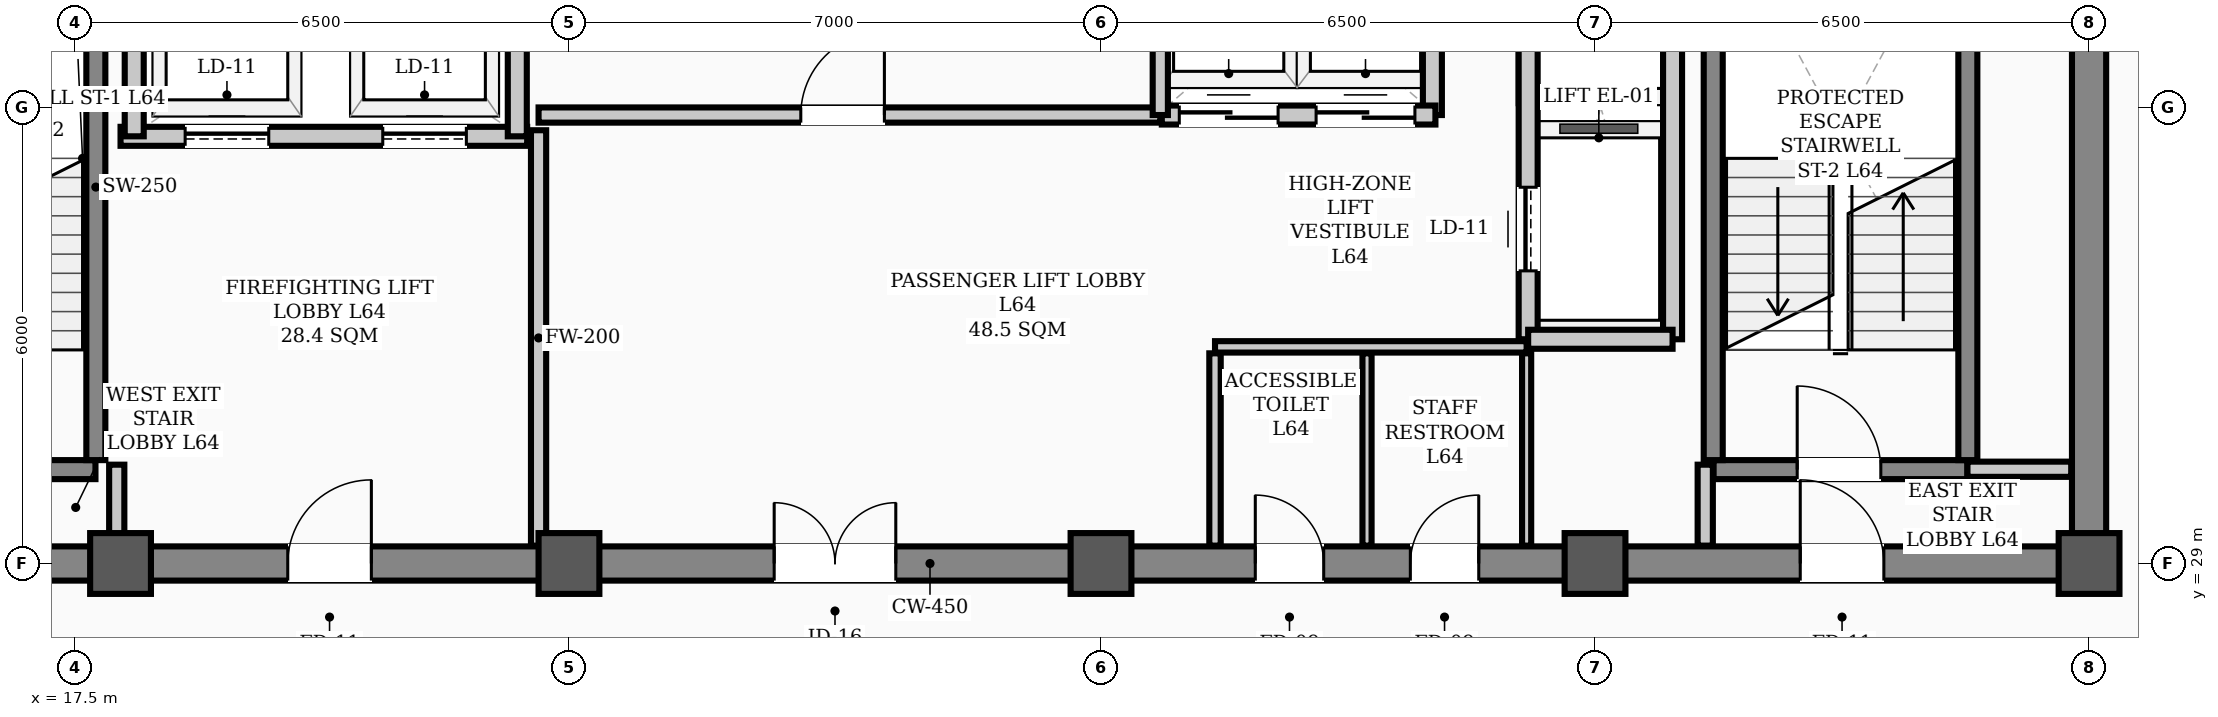
"""IFC4 building model, lengths in metres.
Left out: names, types, materials, properties, quantities, classifications, styles, units other than length and angle.
Written with IfcOpenShell. Run it as: python <this file> out.ifc"""

import sys

from ifc_helpers import new_model, si_unit, direction, frame, frame_2d, origin, origin_2d, place, context, subcontext, project, spatial, rectangle, hollow_rectangle, extrude, element, fill, save


model = new_model("IFC4")
c1 = context("Model", 3, precision=1e-05, world=origin(), true_north=direction((0.0, 1.0)))
c2 = subcontext(c1, "Body", "Model", "MODEL_VIEW")
j1 = project(units=[si_unit("LENGTHUNIT", "METRE"), si_unit("PLANEANGLEUNIT", "RADIAN")], contexts=[c1])
p1 = place(None, origin())
s1 = spatial("IfcSite", under=j1, at=p1, CompositionType="ELEMENT")
p2 = place(p1, origin())
s2 = spatial("IfcBuilding", under=s1, at=p2, CompositionType="ELEMENT")
p3 = place(p2, frame((0.0, 0.0, 257.9)))
s3 = spatial("IfcBuildingStorey", under=s2, at=p3, CompositionType="ELEMENT", Elevation=257.9)
for number, where, z_axis, x_axis in (
    (1, (18.1, 29.0, 0.0), (0.0, 0.0, 1.0), (1.0, 0.0, 0.0)),
    (2, (24.0, 29.0, 0.0), (0.0, 0.0, 1.0), (1.0, 0.0, 0.0)),
    (3, (31.0, 29.0, 0.0), (0.0, 0.0, 1.0), (1.0, 0.0, 0.0)),
    (4, (37.5, 29.0, 0.0), (0.0, 0.0, 1.0), (1.0, 0.0, 0.0)),
    (5, (44.0, 29.0, 0.0), (0.0, 0.0, 1.0), (1.0, 0.0, 0.0)),
):
    element("IfcColumn", number, at=place(p3, frame(where, z_axis=z_axis, x_axis=x_axis)), inside=s3, PredefinedType="COLUMN", context=c2, shape_type="SweptSolid", body=[
        extrude(hollow_rectangle(XDim=0.8, YDim=0.8, WallThickness=0.032, InnerFilletRadius=0.016, OuterFilletRadius=0.048, at=origin_2d()), origin(), (0.0, 0.0, 1.0), 3.9),
    ])
p4 = place(p3, frame((13.5, 29.0, 0.0), z_axis=(0.0, 0.0, 1.0), x_axis=(1.0, 0.0, 0.0)))
e6 = element("IfcWall", 6, at=p4, inside=s3, PredefinedType="SHEAR", context=c2, shape_type="SweptSolid", body=[
    extrude(rectangle(XDim=30.5, YDim=0.45, at=frame_2d((15.25, 0.0))), origin(), (0.0, 0.0, 1.0), 3.72),
])
p5 = place(p4, frame((1.75, 0.0, 0.0)))
e7 = element("IfcOpeningElement", 7, at=p5, cuts=e6, PredefinedType="OPENING", context=c2, shape_type="SweptSolid", body=[
    extrude(rectangle(XDim=1.1, YDim=2.08, at=frame_2d((0.55, 1.04))), frame((0.0, 0.235, 0.0), z_axis=(0.0, -1.0, 0.0), x_axis=(1.0, 0.0, 0.0)), (0.0, 0.0, 1.0), 0.47),
])
p6 = place(p4, frame((26.7, 0.0, 0.0)))
e8 = element("IfcOpeningElement", 8, at=p6, cuts=e6, PredefinedType="OPENING", context=c2, shape_type="SweptSolid", body=[
    extrude(rectangle(XDim=1.1, YDim=2.08, at=frame_2d((0.55, 1.04))), frame((0.0, 0.235, 0.0), z_axis=(0.0, -1.0, 0.0), x_axis=(1.0, 0.0, 0.0)), (0.0, 0.0, 1.0), 0.47),
])
p7 = place(p4, frame((6.8, 0.0, 0.0)))
e9 = element("IfcOpeningElement", 9, at=p7, cuts=e6, PredefinedType="OPENING", context=c2, shape_type="SweptSolid", body=[
    extrude(rectangle(XDim=1.1, YDim=2.08, at=frame_2d((0.55, 1.04))), frame((0.0, 0.235, 0.0), z_axis=(0.0, -1.0, 0.0), x_axis=(1.0, 0.0, 0.0)), (0.0, 0.0, 1.0), 0.47),
])
p8 = place(p4, frame((13.2, 0.0, 0.0)))
e10 = element("IfcOpeningElement", 10, at=p8, cuts=e6, PredefinedType="OPENING", context=c2, shape_type="SweptSolid", body=[
    extrude(rectangle(XDim=1.6, YDim=2.08, at=frame_2d((0.8, 1.04))), frame((0.0, 0.235, 0.0), z_axis=(0.0, -1.0, 0.0), x_axis=(1.0, 0.0, 0.0)), (0.0, 0.0, 1.0), 0.47),
])
p9 = place(p4, frame((19.53, 0.0, 0.0)))
e11 = element("IfcOpeningElement", 11, at=p9, cuts=e6, PredefinedType="OPENING", context=c2, shape_type="SweptSolid", body=[
    extrude(rectangle(XDim=0.9, YDim=2.08, at=frame_2d((0.45, 1.04))), frame((0.0, 0.235, 0.0), z_axis=(0.0, -1.0, 0.0), x_axis=(1.0, 0.0, 0.0)), (0.0, 0.0, 1.0), 0.47),
])
p10 = place(p4, frame((21.57, 0.0, 0.0)))
e12 = element("IfcOpeningElement", 12, at=p10, cuts=e6, PredefinedType="OPENING", context=c2, shape_type="SweptSolid", body=[
    extrude(rectangle(XDim=0.9, YDim=2.08, at=frame_2d((0.45, 1.04))), frame((0.0, 0.235, 0.0), z_axis=(0.0, -1.0, 0.0), x_axis=(1.0, 0.0, 0.0)), (0.0, 0.0, 1.0), 0.47),
])
p11 = place(p3, frame((44.0, 29.35, 0.0), z_axis=(0.0, 0.0, 1.0), x_axis=(0.0, 1.0, 0.0)))
e13 = element("IfcWall", 13, at=p11, inside=s3, PredefinedType="SHEAR", context=c2, shape_type="SweptSolid", body=[
    extrude(rectangle(XDim=8.6, YDim=0.45, at=frame_2d((4.3, 0.0))), origin(), (0.0, 0.0, 1.0), 3.72),
])
p12 = place(p3, frame((14.43, 30.235, 0.0), z_axis=(0.0, 0.0, 1.0), x_axis=(1.0, 0.0, 0.0)))
e14 = element("IfcWall", 14, at=p12, inside=s3, PredefinedType="STANDARD", context=c2, shape_type="SweptSolid", body=[
    extrude(rectangle(XDim=3.34, YDim=0.25, at=frame_2d((1.67, 0.0))), origin(), (0.0, 0.0, 1.0), 3.72),
])
p13 = place(p12, frame((1.1, 0.0, 0.0)))
e15 = element("IfcOpeningElement", 15, at=p13, cuts=e14, PredefinedType="OPENING", context=c2, shape_type="SweptSolid", body=[
    extrude(rectangle(XDim=1.1, YDim=2.08, at=frame_2d((0.55, 1.04))), frame((0.0, 0.135, 0.0), z_axis=(0.0, -1.0, 0.0), x_axis=(1.0, 0.0, 0.0)), (0.0, 0.0, 1.0), 0.27),
])
p14 = place(p3, frame((17.775, 30.36, 0.0), z_axis=(0.0, 0.0, 1.0), x_axis=(0.0, 1.0, 0.0)))
e16 = element("IfcWall", 16, at=p14, inside=s3, PredefinedType="STANDARD", context=c2, shape_type="SweptSolid", body=[
    extrude(rectangle(XDim=7.184, YDim=0.25, at=frame_2d((3.592, 0.0))), origin(), (0.0, 0.0, 1.0), 3.72),
])
p15 = place(p3, frame((39.06, 30.235, 0.0), z_axis=(0.0, 0.0, 1.0), x_axis=(1.0, 0.0, 0.0)))
e17 = element("IfcWall", 17, at=p15, inside=s3, PredefinedType="STANDARD", context=c2, shape_type="SweptSolid", body=[
    extrude(rectangle(XDim=3.34, YDim=0.25, at=frame_2d((1.67, 0.0))), origin(), (0.0, 0.0, 1.0), 3.72),
])
p16 = place(p15, frame((1.1, 0.0, 0.0)))
e18 = element("IfcOpeningElement", 18, at=p16, cuts=e17, PredefinedType="OPENING", context=c2, shape_type="SweptSolid", body=[
    extrude(rectangle(XDim=1.1, YDim=2.08, at=frame_2d((0.55, 1.04))), frame((0.0, 0.135, 0.0), z_axis=(0.0, -1.0, 0.0), x_axis=(1.0, 0.0, 0.0)), (0.0, 0.0, 1.0), 0.27),
])
for number, where, z_axis, x_axis in (
    (19, (39.055, 30.36, 0.0), (0.0, 0.0, 1.0), (0.0, 1.0, 0.0)),
    (20, (42.405, 30.36, 0.0), (0.0, 0.0, 1.0), (0.0, 1.0, 0.0)),
):
    element("IfcWall", number, at=place(p3, frame(where, z_axis=z_axis, x_axis=x_axis)), inside=s3, PredefinedType="STANDARD", context=c2, shape_type="SweptSolid", body=[
        extrude(rectangle(XDim=7.184, YDim=0.25, at=frame_2d((3.592, 0.0))), origin(), (0.0, 0.0, 1.0), 3.72),
    ])
p17 = place(p3, frame((18.1, 34.62, 0.0), z_axis=(0.0, 0.0, 1.0), x_axis=(1.0, 0.0, 0.0)))
e21 = element("IfcWall", 21, at=p17, inside=s3, PredefinedType="STANDARD", context=c2, shape_type="SweptSolid", body=[
    extrude(rectangle(XDim=5.35, YDim=0.25, at=frame_2d((2.675, 0.0))), origin(), (0.0, 0.0, 1.0), 3.72),
])
p18 = place(p17, frame((0.85, 0.0, 0.0)))
e22 = element("IfcOpeningElement", 22, at=p18, cuts=e21, PredefinedType="OPENING", context=c2, shape_type="SweptSolid", body=[
    extrude(rectangle(XDim=1.1, YDim=2.08, at=frame_2d((0.55, 1.04))), frame((0.0, 0.135, 0.0), z_axis=(0.0, -1.0, 0.0), x_axis=(1.0, 0.0, 0.0)), (0.0, 0.0, 1.0), 0.27),
])
p19 = place(p17, frame((3.45, 0.0, 0.0)))
e23 = element("IfcOpeningElement", 23, at=p19, cuts=e21, PredefinedType="OPENING", context=c2, shape_type="SweptSolid", body=[
    extrude(rectangle(XDim=1.1, YDim=2.08, at=frame_2d((0.55, 1.04))), frame((0.0, 0.135, 0.0), z_axis=(0.0, -1.0, 0.0), x_axis=(1.0, 0.0, 0.0)), (0.0, 0.0, 1.0), 0.27),
])
p20 = place(p3, frame((36.62, 31.95, 0.0), z_axis=(0.0, 0.0, 1.0), x_axis=(0.0, 1.0, 0.0)))
e24 = element("IfcWall", 24, at=p20, inside=s3, PredefinedType="STANDARD", context=c2, shape_type="SweptSolid", body=[
    extrude(rectangle(XDim=6.0, YDim=0.25, at=frame_2d((3.0, 0.0))), origin(), (0.0, 0.0, 1.0), 3.4),
])
p21 = place(p20, frame((0.9, 0.0, 0.0)))
e25 = element("IfcOpeningElement", 25, at=p21, cuts=e24, PredefinedType="OPENING", context=c2, shape_type="SweptSolid", body=[
    extrude(rectangle(XDim=1.1, YDim=2.08, at=frame_2d((0.55, 1.04))), frame((0.0, 0.135, 0.0), z_axis=(0.0, -1.0, 0.0), x_axis=(1.0, 0.0, 0.0)), (0.0, 0.0, 1.0), 0.27),
])
p22 = place(p20, frame((4.0, 0.0, 0.0)))
e26 = element("IfcOpeningElement", 26, at=p22, cuts=e24, PredefinedType="OPENING", context=c2, shape_type="SweptSolid", body=[
    extrude(rectangle(XDim=1.1, YDim=2.08, at=frame_2d((0.55, 1.04))), frame((0.0, 0.135, 0.0), z_axis=(0.0, -1.0, 0.0), x_axis=(1.0, 0.0, 0.0)), (0.0, 0.0, 1.0), 0.27),
])
p23 = place(p3, frame((38.52, 31.95, 0.0), z_axis=(0.0, 0.0, 1.0), x_axis=(0.0, 1.0, 0.0)))
e27 = element("IfcWall", 27, at=p23, inside=s3, PredefinedType="STANDARD", context=c2, shape_type="SweptSolid", body=[
    extrude(rectangle(XDim=6.0, YDim=0.25, at=frame_2d((3.0, 0.0))), origin(), (0.0, 0.0, 1.0), 3.48),
])
p24 = place(p3, frame((36.62, 31.95, 0.0), z_axis=(0.0, 0.0, 1.0), x_axis=(1.0, 0.0, 0.0)))
e28 = element("IfcWall", 28, at=p24, inside=s3, PredefinedType="STANDARD", context=c2, shape_type="SweptSolid", body=[
    extrude(rectangle(XDim=1.9, YDim=0.25, at=frame_2d((0.95, 0.0))), origin(), (0.0, 0.0, 1.0), 3.48),
])
for number, where, z_axis, x_axis in (
    (29, (18.28, 34.62, 0.0), (0.0, 0.0, 1.0), (0.0, 1.0, 0.0)),
    (30, (23.32, 34.62, 0.0), (0.0, 0.0, 1.0), (0.0, 1.0, 0.0)),
):
    element("IfcWall", number, at=place(p3, frame(where, z_axis=z_axis, x_axis=x_axis)), inside=s3, PredefinedType="STANDARD", context=c2, shape_type="SweptSolid", body=[
        extrude(rectangle(XDim=3.33, YDim=0.25, at=frame_2d((1.665, 0.0))), origin(), (0.0, 0.0, 1.0), 3.4),
    ])
p25 = place(p3, frame((35.36, 34.9, 0.0), z_axis=(0.0, 0.0, 1.0), x_axis=(0.0, 1.0, 0.0)))
e31 = element("IfcWall", 31, at=p25, inside=s3, PredefinedType="STANDARD", context=c2, shape_type="SweptSolid", body=[
    extrude(rectangle(XDim=3.05, YDim=0.25, at=frame_2d((1.525, 0.0))), origin(), (0.0, 0.0, 1.0), 3.4),
])
p26 = place(p3, frame((31.8, 34.9, 0.0), z_axis=(0.0, 0.0, 1.0), x_axis=(1.0, 0.0, 0.0)))
e32 = element("IfcWall", 32, at=p26, inside=s3, PredefinedType="STANDARD", context=c2, shape_type="SweptSolid", body=[
    extrude(rectangle(XDim=3.6, YDim=0.25, at=frame_2d((1.8, 0.0))), origin(), (0.0, 0.0, 1.0), 3.72),
])
p27 = place(p26, frame((0.23, 0.0, 0.0)))
e33 = element("IfcOpeningElement", 33, at=p27, cuts=e32, PredefinedType="OPENING", context=c2, shape_type="SweptSolid", body=[
    extrude(rectangle(XDim=1.3, YDim=2.08, at=frame_2d((0.65, 1.04))), frame((0.0, 0.135, 0.0), z_axis=(0.0, -1.0, 0.0), x_axis=(1.0, 0.0, 0.0)), (0.0, 0.0, 1.0), 0.27),
])
p28 = place(p26, frame((2.03, 0.0, 0.0)))
e34 = element("IfcOpeningElement", 34, at=p28, cuts=e32, PredefinedType="OPENING", context=c2, shape_type="SweptSolid", body=[
    extrude(rectangle(XDim=1.3, YDim=2.08, at=frame_2d((0.65, 1.04))), frame((0.0, 0.135, 0.0), z_axis=(0.0, -1.0, 0.0), x_axis=(1.0, 0.0, 0.0)), (0.0, 0.0, 1.0), 0.27),
])
p29 = place(p3, frame((42.4, 30.24, 0.0), z_axis=(0.0, 0.0, 1.0), x_axis=(1.0, 0.0, 0.0)))
e35 = element("IfcWall", 35, at=p29, inside=s3, PredefinedType="STANDARD", context=c2, shape_type="SweptSolid", body=[
    extrude(rectangle(XDim=1.365, YDim=0.2, at=frame_2d((0.683, 0.0))), origin(), (0.0, 0.0, 1.0), 3.72),
])
p30 = place(p3, frame((23.6, 34.9, 0.0), z_axis=(0.0, 0.0, 1.0), x_axis=(1.0, 0.0, 0.0)))
e36 = element("IfcWall", 36, at=p30, inside=s3, PredefinedType="STANDARD", context=c2, shape_type="SweptSolid", body=[
    extrude(rectangle(XDim=8.18, YDim=0.2, at=frame_2d((4.09, 0.0))), origin(), (0.0, 0.0, 1.0), 3.72),
])
p31 = place(p30, frame((3.45, 0.0, 0.0)))
e37 = element("IfcOpeningElement", 37, at=p31, cuts=e36, PredefinedType="OPENING", context=c2, shape_type="SweptSolid", body=[
    extrude(rectangle(XDim=1.1, YDim=2.08, at=frame_2d((0.55, 1.04))), frame((0.0, 0.11, 0.0), z_axis=(0.0, -1.0, 0.0), x_axis=(1.0, 0.0, 0.0)), (0.0, 0.0, 1.0), 0.22),
])
p32 = place(p3, frame((32.5, 31.85, 0.0), z_axis=(0.0, 0.0, 1.0), x_axis=(1.0, 0.0, 0.0)))
e38 = element("IfcWall", 38, at=p32, inside=s3, PredefinedType="PARTITIONING", context=c2, shape_type="SweptSolid", body=[
    extrude(rectangle(XDim=4.1, YDim=0.15, at=frame_2d((2.05, 0.0))), origin(), (0.0, 0.0, 1.0), 3.72),
])
p33 = place(p3, frame((18.05, 29.235, 0.0), z_axis=(0.0, 0.0, 1.0), x_axis=(0.0, 1.0, 0.0)))
e39 = element("IfcWall", 39, at=p33, inside=s3, PredefinedType="STANDARD", context=c2, shape_type="SweptSolid", body=[
    extrude(rectangle(XDim=1.065, YDim=0.2, at=frame_2d((0.532, 0.0))), origin(), (0.0, 0.0, 1.0), 3.4),
])
p34 = place(p3, frame((38.95, 29.235, 0.0), z_axis=(0.0, 0.0, 1.0), x_axis=(0.0, 1.0, 0.0)))
e40 = element("IfcWall", 40, at=p34, inside=s3, PredefinedType="STANDARD", context=c2, shape_type="SweptSolid", body=[
    extrude(rectangle(XDim=1.065, YDim=0.2, at=frame_2d((0.532, 0.0))), origin(), (0.0, 0.0, 1.0), 3.72),
])
p35 = place(p3, frame((23.6, 29.235, 0.0), z_axis=(0.0, 0.0, 1.0), x_axis=(0.0, 1.0, 0.0)))
e41 = element("IfcWall", 41, at=p35, inside=s3, PredefinedType="STANDARD", context=c2, shape_type="SweptSolid", body=[
    extrude(rectangle(XDim=5.465, YDim=0.2, at=frame_2d((2.732, 0.0))), origin(), (0.0, 0.0, 1.0), 3.2),
])
p36 = place(p3, frame((32.5, 29.235, 0.0), z_axis=(0.0, 0.0, 1.0), x_axis=(0.0, 1.0, 0.0)))
e42 = element("IfcWall", 42, at=p36, inside=s3, PredefinedType="PARTITIONING", context=c2, shape_type="SweptSolid", body=[
    extrude(rectangle(XDim=2.53, YDim=0.15, at=frame_2d((1.265, 0.0))), origin(), (0.0, 0.0, 1.0), 3.4),
])
for number, where, z_axis, x_axis in (
    (43, (36.6, 29.235, 0.0), (0.0, 0.0, 1.0), (0.0, 1.0, 0.0)),
    (44, (34.5, 29.235, 0.0), (0.0, 0.0, 1.0), (0.0, 1.0, 0.0)),
):
    element("IfcWall", number, at=place(p3, frame(where, z_axis=z_axis, x_axis=x_axis)), inside=s3, PredefinedType="PARTITIONING", context=c2, shape_type="SweptSolid", body=[
        extrude(rectangle(XDim=2.53, YDim=0.12, at=frame_2d((1.265, 0.0))), origin(), (0.0, 0.0, 1.0), 3.4),
    ])
p37 = place(p3, frame((31.78, 34.9, 0.0), z_axis=(0.0, 0.0, 1.0), x_axis=(0.0, 1.0, 0.0)))
e45 = element("IfcWall", 45, at=p37, inside=s3, PredefinedType="STANDARD", context=c2, shape_type="SweptSolid", body=[
    extrude(rectangle(XDim=3.12, YDim=0.2, at=frame_2d((1.56, 0.0))), origin(), (0.0, 0.0, 1.0), 3.4),
])
p38 = place(p16, origin())
e46 = element("IfcDoor", 46, at=p38, inside=s3, OperationType="SINGLE_SWING_LEFT", PredefinedType="DOOR", context=c2, shape_type="SweptSolid", body=[
    extrude(rectangle(XDim=1.1, YDim=2.08, at=frame_2d((0.55, 1.04))), frame((0.0, 0.025, 0.0), z_axis=(0.0, -1.0, 0.0), x_axis=(1.0, 0.0, 0.0)), (0.0, 0.0, 1.0), 0.05),
])
fill(e18, e46)
p39 = place(p6, origin())
e47 = element("IfcDoor", 47, at=p39, inside=s3, OperationType="SINGLE_SWING_LEFT", PredefinedType="DOOR", context=c2, shape_type="SweptSolid", body=[
    extrude(rectangle(XDim=1.1, YDim=2.08, at=frame_2d((0.55, 1.04))), frame((0.0, 0.025, 0.0), z_axis=(0.0, -1.0, 0.0), x_axis=(1.0, 0.0, 0.0)), (0.0, 0.0, 1.0), 0.05),
])
fill(e8, e47)
p40 = place(p7, origin())
e48 = element("IfcDoor", 48, at=p40, inside=s3, OperationType="SINGLE_SWING_RIGHT", PredefinedType="DOOR", context=c2, shape_type="SweptSolid", body=[
    extrude(rectangle(XDim=1.1, YDim=2.08, at=frame_2d((0.55, 1.04))), frame((0.0, 0.025, 0.0), z_axis=(0.0, -1.0, 0.0), x_axis=(1.0, 0.0, 0.0)), (0.0, 0.0, 1.0), 0.05),
])
fill(e9, e48)
p41 = place(p8, origin())
e49 = element("IfcDoor", 49, at=p41, inside=s3, OperationType="DOUBLE_DOOR_SINGLE_SWING", PredefinedType="DOOR", context=c2, shape_type="SweptSolid", body=[
    extrude(rectangle(XDim=1.6, YDim=2.08, at=frame_2d((0.8, 1.04))), frame((0.0, 0.025, 0.0), z_axis=(0.0, -1.0, 0.0), x_axis=(1.0, 0.0, 0.0)), (0.0, 0.0, 1.0), 0.05),
])
fill(e10, e49)
p42 = place(p31, origin())
e50 = element("IfcDoor", 50, at=p42, inside=s3, OperationType="SINGLE_SWING_RIGHT", PredefinedType="DOOR", context=c2, shape_type="SweptSolid", body=[
    extrude(rectangle(XDim=1.1, YDim=2.08, at=frame_2d((0.55, 1.04))), frame((0.0, 0.025, 0.0), z_axis=(0.0, -1.0, 0.0), x_axis=(1.0, 0.0, 0.0)), (0.0, 0.0, 1.0), 0.05),
])
fill(e37, e50)
p43 = place(p9, origin())
e51 = element("IfcDoor", 51, at=p43, inside=s3, OperationType="SINGLE_SWING_LEFT", PredefinedType="DOOR", context=c2, shape_type="SweptSolid", body=[
    extrude(rectangle(XDim=0.9, YDim=2.08, at=frame_2d((0.45, 1.04))), frame((0.0, 0.025, 0.0), z_axis=(0.0, -1.0, 0.0), x_axis=(1.0, 0.0, 0.0)), (0.0, 0.0, 1.0), 0.05),
])
fill(e11, e51)
p44 = place(p10, origin())
e52 = element("IfcDoor", 52, at=p44, inside=s3, OperationType="SINGLE_SWING_RIGHT", PredefinedType="DOOR", context=c2, shape_type="SweptSolid", body=[
    extrude(rectangle(XDim=0.9, YDim=2.08, at=frame_2d((0.45, 1.04))), frame((0.0, 0.025, 0.0), z_axis=(0.0, -1.0, 0.0), x_axis=(1.0, 0.0, 0.0)), (0.0, 0.0, 1.0), 0.05),
])
fill(e12, e52)
p45 = place(p18, origin())
e53 = element("IfcDoor", 53, at=p45, inside=s3, OperationType="SLIDING_TO_LEFT", PredefinedType="DOOR", context=c2, shape_type="SweptSolid", body=[
    extrude(rectangle(XDim=1.1, YDim=2.08, at=frame_2d((0.55, 1.04))), frame((0.0, 0.025, 0.0), z_axis=(0.0, -1.0, 0.0), x_axis=(1.0, 0.0, 0.0)), (0.0, 0.0, 1.0), 0.05),
])
fill(e22, e53)
p46 = place(p19, origin())
e54 = element("IfcDoor", 54, at=p46, inside=s3, OperationType="SLIDING_TO_LEFT", PredefinedType="DOOR", context=c2, shape_type="SweptSolid", body=[
    extrude(rectangle(XDim=1.1, YDim=2.08, at=frame_2d((0.55, 1.04))), frame((0.0, 0.025, 0.0), z_axis=(0.0, -1.0, 0.0), x_axis=(1.0, 0.0, 0.0)), (0.0, 0.0, 1.0), 0.05),
])
fill(e23, e54)
p47 = place(p21, origin())
e55 = element("IfcDoor", 55, at=p47, inside=s3, OperationType="SLIDING_TO_LEFT", PredefinedType="DOOR", context=c2, shape_type="SweptSolid", body=[
    extrude(rectangle(XDim=1.1, YDim=2.08, at=frame_2d((0.55, 1.04))), frame((0.0, 0.025, 0.0), z_axis=(0.0, -1.0, 0.0), x_axis=(1.0, 0.0, 0.0)), (0.0, 0.0, 1.0), 0.05),
])
fill(e25, e55)
p48 = place(p27, origin())
e56 = element("IfcDoor", 56, at=p48, inside=s3, OperationType="DOUBLE_DOOR_SLIDING", PredefinedType="DOOR", context=c2, shape_type="SweptSolid", body=[
    extrude(rectangle(XDim=1.3, YDim=2.08, at=frame_2d((0.65, 1.04))), frame((0.0, 0.025, 0.0), z_axis=(0.0, -1.0, 0.0), x_axis=(1.0, 0.0, 0.0)), (0.0, 0.0, 1.0), 0.05),
])
fill(e33, e56)
p49 = place(p28, origin())
e57 = element("IfcDoor", 57, at=p49, inside=s3, OperationType="DOUBLE_DOOR_SLIDING", PredefinedType="DOOR", context=c2, shape_type="SweptSolid", body=[
    extrude(rectangle(XDim=1.3, YDim=2.08, at=frame_2d((0.65, 1.04))), frame((0.0, 0.025, 0.0), z_axis=(0.0, -1.0, 0.0), x_axis=(1.0, 0.0, 0.0)), (0.0, 0.0, 1.0), 0.05),
])
fill(e34, e57)
save(model, sys.argv[1])
